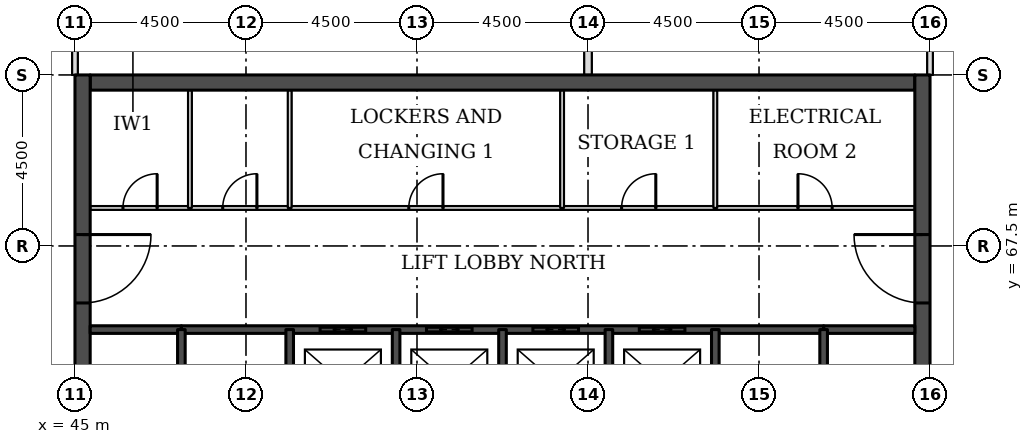
"""IFC4 building model, lengths in metres.
Left out: names, types, materials, properties, quantities, classifications, styles, units other than length and angle.
Written with IfcOpenShell. Run it as: python <this file> out.ifc"""

import sys

from ifc_helpers import new_model, si_unit, direction, frame, frame_2d, origin, place, context, subcontext, project, spatial, rectangle, extrude, element, fill, save


model = new_model("IFC4")
c1 = context("Model", 3, precision=1e-05, world=origin(), true_north=direction((0.0, 1.0)))
c2 = subcontext(c1, "Body", "Model", "MODEL_VIEW")
j1 = project(units=[si_unit("LENGTHUNIT", "METRE"), si_unit("PLANEANGLEUNIT", "RADIAN")], contexts=[c1])
p1 = place(None, origin())
s1 = spatial("IfcSite", under=j1, at=p1, CompositionType="ELEMENT")
p2 = place(p1, origin())
s2 = spatial("IfcBuilding", under=s1, at=p2, CompositionType="ELEMENT")
p3 = place(p2, frame((0.0, 0.0, 260.0)))
s3 = spatial("IfcBuildingStorey", under=s2, at=p3, CompositionType="ELEMENT", Elevation=260.0)
p4 = place(p3, frame((45.4, 71.8, 0.0), z_axis=(0.0, 0.0, 1.0), x_axis=(1.0, 0.0, 0.0)))
e1 = element("IfcWall", 1, at=p4, inside=s3, PredefinedType="SHEAR", context=c2, shape_type="SweptSolid", body=[
    extrude(rectangle(XDim=21.7, YDim=0.4, at=frame_2d((10.85, 0.0))), origin(), (0.0, 0.0, 1.0), 3.7),
])
p5 = place(p3, frame((45.2, 49.5, 0.0), z_axis=(0.0, 0.0, 1.0), x_axis=(0.0, 1.0, 0.0)))
e2 = element("IfcWall", 2, at=p5, inside=s3, PredefinedType="SHEAR", context=c2, shape_type="SweptSolid", body=[
    extrude(rectangle(XDim=22.5, YDim=0.4, at=frame_2d((11.25, 0.0))), origin(), (0.0, 0.0, 1.0), 3.7),
])
p6 = place(p5, frame((4.2, 0.0, 0.0)))
e3 = element("IfcOpeningElement", 3, at=p6, cuts=e2, PredefinedType="OPENING", context=c2, shape_type="SweptSolid", body=[
    extrude(rectangle(XDim=1.8, YDim=2.1, at=frame_2d((0.9, 1.05))), frame((0.0, 0.21, 0.0), z_axis=(0.0, -1.0, 0.0), x_axis=(1.0, 0.0, 0.0)), (0.0, 0.0, 1.0), 0.42),
])
p7 = place(p5, frame((6.9, 0.0, 0.0)))
e4 = element("IfcOpeningElement", 4, at=p7, cuts=e2, PredefinedType="OPENING", context=c2, shape_type="SweptSolid", body=[
    extrude(rectangle(XDim=1.1, YDim=2.1, at=frame_2d((0.55, 1.05))), frame((0.0, 0.21, 0.0), z_axis=(0.0, -1.0, 0.0), x_axis=(1.0, 0.0, 0.0)), (0.0, 0.0, 1.0), 0.42),
])
p8 = place(p5, frame((13.6, 0.0, 0.0)))
e5 = element("IfcOpeningElement", 5, at=p8, cuts=e2, PredefinedType="OPENING", context=c2, shape_type="SweptSolid", body=[
    extrude(rectangle(XDim=1.1, YDim=2.1, at=frame_2d((0.55, 1.05))), frame((0.0, 0.21, 0.0), z_axis=(0.0, -1.0, 0.0), x_axis=(1.0, 0.0, 0.0)), (0.0, 0.0, 1.0), 0.42),
])
p9 = place(p5, frame((16.5, 0.0, 0.0)))
e6 = element("IfcOpeningElement", 6, at=p9, cuts=e2, PredefinedType="OPENING", context=c2, shape_type="SweptSolid", body=[
    extrude(rectangle(XDim=1.8, YDim=2.1, at=frame_2d((0.9, 1.05))), frame((0.0, 0.21, 0.0), z_axis=(0.0, -1.0, 0.0), x_axis=(1.0, 0.0, 0.0)), (0.0, 0.0, 1.0), 0.42),
])
p10 = place(p3, frame((67.3, 49.5, 0.0), z_axis=(0.0, 0.0, 1.0), x_axis=(0.0, 1.0, 0.0)))
e7 = element("IfcWall", 7, at=p10, inside=s3, PredefinedType="SHEAR", context=c2, shape_type="SweptSolid", body=[
    extrude(rectangle(XDim=22.5, YDim=0.4, at=frame_2d((11.25, 0.0))), origin(), (0.0, 0.0, 1.0), 3.7),
])
p11 = place(p10, frame((4.2, 0.0, 0.0)))
e8 = element("IfcOpeningElement", 8, at=p11, cuts=e7, PredefinedType="OPENING", context=c2, shape_type="SweptSolid", body=[
    extrude(rectangle(XDim=1.8, YDim=2.1, at=frame_2d((0.9, 1.05))), frame((0.0, 0.21, 0.0), z_axis=(0.0, -1.0, 0.0), x_axis=(1.0, 0.0, 0.0)), (0.0, 0.0, 1.0), 0.42),
])
p12 = place(p10, frame((6.9, 0.0, 0.0)))
e9 = element("IfcOpeningElement", 9, at=p12, cuts=e7, PredefinedType="OPENING", context=c2, shape_type="SweptSolid", body=[
    extrude(rectangle(XDim=1.1, YDim=2.1, at=frame_2d((0.55, 1.05))), frame((0.0, 0.21, 0.0), z_axis=(0.0, -1.0, 0.0), x_axis=(1.0, 0.0, 0.0)), (0.0, 0.0, 1.0), 0.42),
])
p13 = place(p10, frame((13.6, 0.0, 0.0)))
e10 = element("IfcOpeningElement", 10, at=p13, cuts=e7, PredefinedType="OPENING", context=c2, shape_type="SweptSolid", body=[
    extrude(rectangle(XDim=1.1, YDim=2.1, at=frame_2d((0.55, 1.05))), frame((0.0, 0.21, 0.0), z_axis=(0.0, -1.0, 0.0), x_axis=(1.0, 0.0, 0.0)), (0.0, 0.0, 1.0), 0.42),
])
p14 = place(p10, frame((16.5, 0.0, 0.0)))
e11 = element("IfcOpeningElement", 11, at=p14, cuts=e7, PredefinedType="OPENING", context=c2, shape_type="SweptSolid", body=[
    extrude(rectangle(XDim=1.8, YDim=2.1, at=frame_2d((0.9, 1.05))), frame((0.0, 0.21, 0.0), z_axis=(0.0, -1.0, 0.0), x_axis=(1.0, 0.0, 0.0)), (0.0, 0.0, 1.0), 0.42),
])
p15 = place(p3, frame((45.0, 72.0, 0.0), z_axis=(0.0, 0.0, 1.0), x_axis=(0.0, 1.0, 0.0)))
e12 = element("IfcWall", 12, at=p15, inside=s3, PredefinedType="PARTITIONING", context=c2, shape_type="SweptSolid", body=[
    extrude(rectangle(XDim=3.0, YDim=0.15, at=frame_2d((1.5, 0.0))), origin(), (0.0, 0.0, 1.0), 2.922),
])
p16 = place(p15, frame((1.0, 0.0, 0.0)))
e13 = element("IfcOpeningElement", 13, at=p16, cuts=e12, PredefinedType="OPENING", context=c2, shape_type="SweptSolid", body=[
    extrude(rectangle(XDim=1.0, YDim=2.1, at=frame_2d((0.5, 1.05))), frame((0.0, 0.085, 0.0), z_axis=(0.0, -1.0, 0.0), x_axis=(1.0, 0.0, 0.0)), (0.0, 0.0, 1.0), 0.17),
])
p17 = place(p3, frame((58.5, 72.0, 0.0), z_axis=(0.0, 0.0, 1.0), x_axis=(0.0, 1.0, 0.0)))
e14 = element("IfcWall", 14, at=p17, inside=s3, PredefinedType="PARTITIONING", context=c2, shape_type="SweptSolid", body=[
    extrude(rectangle(XDim=4.5, YDim=0.2, at=frame_2d((2.25, 0.0))), origin(), (0.0, 0.0, 1.0), 3.45),
])
p18 = place(p3, frame((67.5, 72.0, 0.0), z_axis=(0.0, 0.0, 1.0), x_axis=(0.0, 1.0, 0.0)))
e15 = element("IfcWall", 15, at=p18, inside=s3, PredefinedType="PARTITIONING", context=c2, shape_type="SweptSolid", body=[
    extrude(rectangle(XDim=9.45, YDim=0.15, at=frame_2d((4.725, 0.0))), origin(), (0.0, 0.0, 1.0), 2.922),
])
p19 = place(p18, frame((4.25, 0.0, 0.0)))
e16 = element("IfcOpeningElement", 16, at=p19, cuts=e15, PredefinedType="OPENING", context=c2, shape_type="SweptSolid", body=[
    extrude(rectangle(XDim=1.0, YDim=2.1, at=frame_2d((0.5, 1.05))), frame((0.0, 0.085, 0.0), z_axis=(0.0, -1.0, 0.0), x_axis=(1.0, 0.0, 0.0)), (0.0, 0.0, 1.0), 0.17),
])
for number, where, z_axis, x_axis in (
    (17, (45.4, 65.3, 0.0), (0.0, 0.0, 1.0), (1.0, 0.0, 0.0)),
    (18, (64.7, 65.3, 0.0), (0.0, 0.0, 1.0), (1.0, 0.0, 0.0)),
):
    element("IfcWall", number, at=place(p3, frame(where, z_axis=z_axis, x_axis=x_axis)), inside=s3, PredefinedType="SOLIDWALL", context=c2, shape_type="SweptSolid", body=[
        extrude(rectangle(XDim=2.4, YDim=0.2, at=frame_2d((1.2, 0.0))), origin(), (0.0, 0.0, 1.0), 3.45),
    ])
p20 = place(p3, frame((47.8, 65.3, 0.0), z_axis=(0.0, 0.0, 1.0), x_axis=(1.0, 0.0, 0.0)))
e19 = element("IfcWall", 19, at=p20, inside=s3, PredefinedType="SOLIDWALL", context=c2, shape_type="SweptSolid", body=[
    extrude(rectangle(XDim=16.9, YDim=0.2, at=frame_2d((8.45, 0.0))), origin(), (0.0, 0.0, 1.0), 3.45),
])
p21 = place(p20, frame((3.65, 0.0, 0.0)))
e20 = element("IfcOpeningElement", 20, at=p21, cuts=e19, PredefinedType="OPENING", context=c2, shape_type="SweptSolid", body=[
    extrude(rectangle(XDim=1.2, YDim=2.1, at=frame_2d((0.6, 1.05))), frame((0.0, 0.11, 0.0), z_axis=(0.0, -1.0, 0.0), x_axis=(1.0, 0.0, 0.0)), (0.0, 0.0, 1.0), 0.22),
])
p22 = place(p20, frame((6.45, 0.0, 0.0)))
e21 = element("IfcOpeningElement", 21, at=p22, cuts=e19, PredefinedType="OPENING", context=c2, shape_type="SweptSolid", body=[
    extrude(rectangle(XDim=1.2, YDim=2.1, at=frame_2d((0.6, 1.05))), frame((0.0, 0.11, 0.0), z_axis=(0.0, -1.0, 0.0), x_axis=(1.0, 0.0, 0.0)), (0.0, 0.0, 1.0), 0.22),
])
p23 = place(p20, frame((9.25, 0.0, 0.0)))
e22 = element("IfcOpeningElement", 22, at=p23, cuts=e19, PredefinedType="OPENING", context=c2, shape_type="SweptSolid", body=[
    extrude(rectangle(XDim=1.2, YDim=2.1, at=frame_2d((0.6, 1.05))), frame((0.0, 0.11, 0.0), z_axis=(0.0, -1.0, 0.0), x_axis=(1.0, 0.0, 0.0)), (0.0, 0.0, 1.0), 0.22),
])
p24 = place(p20, frame((12.05, 0.0, 0.0)))
e23 = element("IfcOpeningElement", 23, at=p24, cuts=e19, PredefinedType="OPENING", context=c2, shape_type="SweptSolid", body=[
    extrude(rectangle(XDim=1.2, YDim=2.1, at=frame_2d((0.6, 1.05))), frame((0.0, 0.11, 0.0), z_axis=(0.0, -1.0, 0.0), x_axis=(1.0, 0.0, 0.0)), (0.0, 0.0, 1.0), 0.22),
])
p25 = place(p3, frame((45.4, 68.5, 0.0), z_axis=(0.0, 0.0, 1.0), x_axis=(1.0, 0.0, 0.0)))
e24 = element("IfcWall", 24, at=p25, inside=s3, PredefinedType="PARTITIONING", context=c2, shape_type="SweptSolid", body=[
    extrude(rectangle(XDim=21.7, YDim=0.1, at=frame_2d((10.85, 0.0))), origin(), (0.0, 0.0, 1.0), 3.45),
])
p26 = place(p25, frame((18.625, 0.0, 0.0)))
e25 = element("IfcOpeningElement", 25, at=p26, cuts=e24, PredefinedType="OPENING", context=c2, shape_type="SweptSolid", body=[
    extrude(rectangle(XDim=0.9, YDim=2.1, at=frame_2d((0.45, 1.05))), frame((0.0, 0.06, 0.0), z_axis=(0.0, -1.0, 0.0), x_axis=(1.0, 0.0, 0.0)), (0.0, 0.0, 1.0), 0.12),
])
p27 = place(p25, frame((0.863, 0.0, 0.0)))
e26 = element("IfcOpeningElement", 26, at=p27, cuts=e24, PredefinedType="OPENING", context=c2, shape_type="SweptSolid", body=[
    extrude(rectangle(XDim=0.9, YDim=2.1, at=frame_2d((0.45, 1.05))), frame((0.0, 0.06, 0.0), z_axis=(0.0, -1.0, 0.0), x_axis=(1.0, 0.0, 0.0)), (0.0, 0.0, 1.0), 0.12),
])
p28 = place(p25, frame((3.488, 0.0, 0.0)))
e27 = element("IfcOpeningElement", 27, at=p28, cuts=e24, PredefinedType="OPENING", context=c2, shape_type="SweptSolid", body=[
    extrude(rectangle(XDim=0.9, YDim=2.1, at=frame_2d((0.45, 1.05))), frame((0.0, 0.06, 0.0), z_axis=(0.0, -1.0, 0.0), x_axis=(1.0, 0.0, 0.0)), (0.0, 0.0, 1.0), 0.12),
])
p29 = place(p25, frame((13.984, 0.0, 0.0)))
e28 = element("IfcOpeningElement", 28, at=p29, cuts=e24, PredefinedType="OPENING", context=c2, shape_type="SweptSolid", body=[
    extrude(rectangle(XDim=0.9, YDim=2.1, at=frame_2d((0.45, 1.05))), frame((0.0, 0.06, 0.0), z_axis=(0.0, -1.0, 0.0), x_axis=(1.0, 0.0, 0.0)), (0.0, 0.0, 1.0), 0.12),
])
p30 = place(p25, frame((8.384, 0.0, 0.0)))
e29 = element("IfcOpeningElement", 29, at=p30, cuts=e24, PredefinedType="OPENING", context=c2, shape_type="SweptSolid", body=[
    extrude(rectangle(XDim=0.9, YDim=2.1, at=frame_2d((0.45, 1.05))), frame((0.0, 0.06, 0.0), z_axis=(0.0, -1.0, 0.0), x_axis=(1.0, 0.0, 0.0)), (0.0, 0.0, 1.0), 0.12),
])
p31 = place(p3, frame((47.8, 62.0, 0.0), z_axis=(0.0, 0.0, 1.0), x_axis=(0.0, 1.0, 0.0)))
e30 = element("IfcWall", 30, at=p31, inside=s3, PredefinedType="SOLIDWALL", context=c2, shape_type="SweptSolid", body=[
    extrude(rectangle(XDim=3.3, YDim=0.2, at=frame_2d((1.65, 0.0))), origin(), (0.0, 0.0, 1.0), 3.45),
])
p32 = place(p31, frame((1.1, 0.0, 0.0)))
e31 = element("IfcOpeningElement", 31, at=p32, cuts=e30, PredefinedType="OPENING", context=c2, shape_type="SweptSolid", body=[
    extrude(rectangle(XDim=1.1, YDim=2.1, at=frame_2d((0.55, 1.05))), frame((0.0, 0.11, 0.0), z_axis=(0.0, -1.0, 0.0), x_axis=(1.0, 0.0, 0.0)), (0.0, 0.0, 1.0), 0.22),
])
for number, where, z_axis, x_axis in (
    (32, (48.025, 68.5, 0.0), (0.0, 0.0, 1.0), (0.0, 1.0, 0.0)),
    (33, (50.65, 68.5, 0.0), (0.0, 0.0, 1.0), (0.0, 1.0, 0.0)),
):
    element("IfcWall", number, at=place(p3, frame(where, z_axis=z_axis, x_axis=x_axis)), inside=s3, PredefinedType="PARTITIONING", context=c2, shape_type="SweptSolid", body=[
        extrude(rectangle(XDim=3.1, YDim=0.1, at=frame_2d((1.55, 0.0))), origin(), (0.0, 0.0, 1.0), 3.45),
    ])
p33 = place(p3, frame((50.65, 62.0, 0.0), z_axis=(0.0, 0.0, 1.0), x_axis=(0.0, 1.0, 0.0)))
e34 = element("IfcWall", 34, at=p33, inside=s3, PredefinedType="SOLIDWALL", context=c2, shape_type="SweptSolid", body=[
    extrude(rectangle(XDim=3.3, YDim=0.2, at=frame_2d((1.65, 0.0))), origin(), (0.0, 0.0, 1.0), 3.45),
])
for number, where, z_axis, x_axis in (
    (35, (53.45, 62.5, 0.0), (0.0, 0.0, 1.0), (0.0, 1.0, 0.0)),
    (36, (56.25, 62.5, 0.0), (0.0, 0.0, 1.0), (0.0, 1.0, 0.0)),
):
    element("IfcWall", number, at=place(p3, frame(where, z_axis=z_axis, x_axis=x_axis)), inside=s3, PredefinedType="SOLIDWALL", context=c2, shape_type="SweptSolid", body=[
        extrude(rectangle(XDim=2.8, YDim=0.2, at=frame_2d((1.4, 0.0))), origin(), (0.0, 0.0, 1.0), 3.45),
    ])
p34 = place(p3, frame((57.818, 68.5, 0.0), z_axis=(0.0, 0.0, 1.0), x_axis=(0.0, 1.0, 0.0)))
e37 = element("IfcWall", 37, at=p34, inside=s3, PredefinedType="PARTITIONING", context=c2, shape_type="SweptSolid", body=[
    extrude(rectangle(XDim=3.1, YDim=0.1, at=frame_2d((1.55, 0.0))), origin(), (0.0, 0.0, 1.0), 3.45),
])
p35 = place(p3, frame((59.05, 62.5, 0.0), z_axis=(0.0, 0.0, 1.0), x_axis=(0.0, 1.0, 0.0)))
e38 = element("IfcWall", 38, at=p35, inside=s3, PredefinedType="SOLIDWALL", context=c2, shape_type="SweptSolid", body=[
    extrude(rectangle(XDim=2.8, YDim=0.2, at=frame_2d((1.4, 0.0))), origin(), (0.0, 0.0, 1.0), 3.45),
])
p36 = place(p3, frame((61.85, 68.5, 0.0), z_axis=(0.0, 0.0, 1.0), x_axis=(0.0, 1.0, 0.0)))
e39 = element("IfcWall", 39, at=p36, inside=s3, PredefinedType="PARTITIONING", context=c2, shape_type="SweptSolid", body=[
    extrude(rectangle(XDim=3.1, YDim=0.1, at=frame_2d((1.55, 0.0))), origin(), (0.0, 0.0, 1.0), 3.45),
])
p37 = place(p3, frame((61.85, 62.0, 0.0), z_axis=(0.0, 0.0, 1.0), x_axis=(0.0, 1.0, 0.0)))
e40 = element("IfcWall", 40, at=p37, inside=s3, PredefinedType="SOLIDWALL", context=c2, shape_type="SweptSolid", body=[
    extrude(rectangle(XDim=3.3, YDim=0.2, at=frame_2d((1.65, 0.0))), origin(), (0.0, 0.0, 1.0), 3.45),
])
p38 = place(p3, frame((64.7, 62.0, 0.0), z_axis=(0.0, 0.0, 1.0), x_axis=(0.0, 1.0, 0.0)))
e41 = element("IfcWall", 41, at=p38, inside=s3, PredefinedType="SOLIDWALL", context=c2, shape_type="SweptSolid", body=[
    extrude(rectangle(XDim=3.3, YDim=0.2, at=frame_2d((1.65, 0.0))), origin(), (0.0, 0.0, 1.0), 3.45),
])
p39 = place(p38, frame((1.1, 0.0, 0.0)))
e42 = element("IfcOpeningElement", 42, at=p39, cuts=e41, PredefinedType="OPENING", context=c2, shape_type="SweptSolid", body=[
    extrude(rectangle(XDim=1.1, YDim=2.1, at=frame_2d((0.55, 1.05))), frame((0.0, 0.11, 0.0), z_axis=(0.0, -1.0, 0.0), x_axis=(1.0, 0.0, 0.0)), (0.0, 0.0, 1.0), 0.22),
])
p40 = place(p21, origin())
e43 = element("IfcDoor", 43, at=p40, inside=s3, OperationType="DOUBLE_DOOR_SLIDING", PredefinedType="DOOR", context=c2, shape_type="SweptSolid", body=[
    extrude(rectangle(XDim=1.2, YDim=2.1, at=frame_2d((0.6, 1.05))), frame((0.0, 0.025, 0.0), z_axis=(0.0, -1.0, 0.0), x_axis=(1.0, 0.0, 0.0)), (0.0, 0.0, 1.0), 0.05),
])
fill(e20, e43)
p41 = place(p22, origin())
e44 = element("IfcDoor", 44, at=p41, inside=s3, OperationType="DOUBLE_DOOR_SLIDING", PredefinedType="DOOR", context=c2, shape_type="SweptSolid", body=[
    extrude(rectangle(XDim=1.2, YDim=2.1, at=frame_2d((0.6, 1.05))), frame((0.0, 0.025, 0.0), z_axis=(0.0, -1.0, 0.0), x_axis=(1.0, 0.0, 0.0)), (0.0, 0.0, 1.0), 0.05),
])
fill(e21, e44)
p42 = place(p23, origin())
e45 = element("IfcDoor", 45, at=p42, inside=s3, OperationType="DOUBLE_DOOR_SLIDING", PredefinedType="DOOR", context=c2, shape_type="SweptSolid", body=[
    extrude(rectangle(XDim=1.2, YDim=2.1, at=frame_2d((0.6, 1.05))), frame((0.0, 0.025, 0.0), z_axis=(0.0, -1.0, 0.0), x_axis=(1.0, 0.0, 0.0)), (0.0, 0.0, 1.0), 0.05),
])
fill(e22, e45)
p43 = place(p24, origin())
e46 = element("IfcDoor", 46, at=p43, inside=s3, OperationType="DOUBLE_DOOR_SLIDING", PredefinedType="DOOR", context=c2, shape_type="SweptSolid", body=[
    extrude(rectangle(XDim=1.2, YDim=2.1, at=frame_2d((0.6, 1.05))), frame((0.0, 0.025, 0.0), z_axis=(0.0, -1.0, 0.0), x_axis=(1.0, 0.0, 0.0)), (0.0, 0.0, 1.0), 0.05),
])
fill(e23, e46)
p44 = place(p9, frame((1.8, 0.0, 0.0), z_axis=(0.0, 0.0, 1.0), x_axis=(-1.0, 0.0, 0.0)))
e47 = element("IfcDoor", 47, at=p44, inside=s3, OperationType="SINGLE_SWING_LEFT", PredefinedType="DOOR", context=c2, shape_type="SweptSolid", body=[
    extrude(rectangle(XDim=1.8, YDim=2.1, at=frame_2d((0.9, 1.05))), frame((0.0, 0.025, 0.0), z_axis=(0.0, -1.0, 0.0), x_axis=(1.0, 0.0, 0.0)), (0.0, 0.0, 1.0), 0.05),
])
fill(e6, e47)
p45 = place(p14, origin())
e48 = element("IfcDoor", 48, at=p45, inside=s3, OperationType="SINGLE_SWING_RIGHT", PredefinedType="DOOR", context=c2, shape_type="SweptSolid", body=[
    extrude(rectangle(XDim=1.8, YDim=2.1, at=frame_2d((0.9, 1.05))), frame((0.0, 0.025, 0.0), z_axis=(0.0, -1.0, 0.0), x_axis=(1.0, 0.0, 0.0)), (0.0, 0.0, 1.0), 0.05),
])
fill(e11, e48)
p46 = place(p26, origin())
e49 = element("IfcDoor", 49, at=p46, inside=s3, OperationType="SINGLE_SWING_LEFT", PredefinedType="DOOR", context=c2, shape_type="SweptSolid", body=[
    extrude(rectangle(XDim=0.9, YDim=2.1, at=frame_2d((0.45, 1.05))), frame((0.0, 0.025, 0.0), z_axis=(0.0, -1.0, 0.0), x_axis=(1.0, 0.0, 0.0)), (0.0, 0.0, 1.0), 0.05),
])
fill(e25, e49)
p47 = place(p27, origin())
e50 = element("IfcDoor", 50, at=p47, inside=s3, OperationType="SINGLE_SWING_RIGHT", PredefinedType="DOOR", context=c2, shape_type="SweptSolid", body=[
    extrude(rectangle(XDim=0.9, YDim=2.1, at=frame_2d((0.45, 1.05))), frame((0.0, 0.025, 0.0), z_axis=(0.0, -1.0, 0.0), x_axis=(1.0, 0.0, 0.0)), (0.0, 0.0, 1.0), 0.05),
])
fill(e26, e50)
p48 = place(p28, origin())
e51 = element("IfcDoor", 51, at=p48, inside=s3, OperationType="SINGLE_SWING_RIGHT", PredefinedType="DOOR", context=c2, shape_type="SweptSolid", body=[
    extrude(rectangle(XDim=0.9, YDim=2.1, at=frame_2d((0.45, 1.05))), frame((0.0, 0.025, 0.0), z_axis=(0.0, -1.0, 0.0), x_axis=(1.0, 0.0, 0.0)), (0.0, 0.0, 1.0), 0.05),
])
fill(e27, e51)
p49 = place(p29, origin())
e52 = element("IfcDoor", 52, at=p49, inside=s3, OperationType="SINGLE_SWING_RIGHT", PredefinedType="DOOR", context=c2, shape_type="SweptSolid", body=[
    extrude(rectangle(XDim=0.9, YDim=2.1, at=frame_2d((0.45, 1.05))), frame((0.0, 0.025, 0.0), z_axis=(0.0, -1.0, 0.0), x_axis=(1.0, 0.0, 0.0)), (0.0, 0.0, 1.0), 0.05),
])
fill(e28, e52)
p50 = place(p30, origin())
e53 = element("IfcDoor", 53, at=p50, inside=s3, OperationType="SINGLE_SWING_RIGHT", PredefinedType="DOOR", context=c2, shape_type="SweptSolid", body=[
    extrude(rectangle(XDim=0.9, YDim=2.1, at=frame_2d((0.45, 1.05))), frame((0.0, 0.025, 0.0), z_axis=(0.0, -1.0, 0.0), x_axis=(1.0, 0.0, 0.0)), (0.0, 0.0, 1.0), 0.05),
])
fill(e29, e53)
save(model, sys.argv[1])
